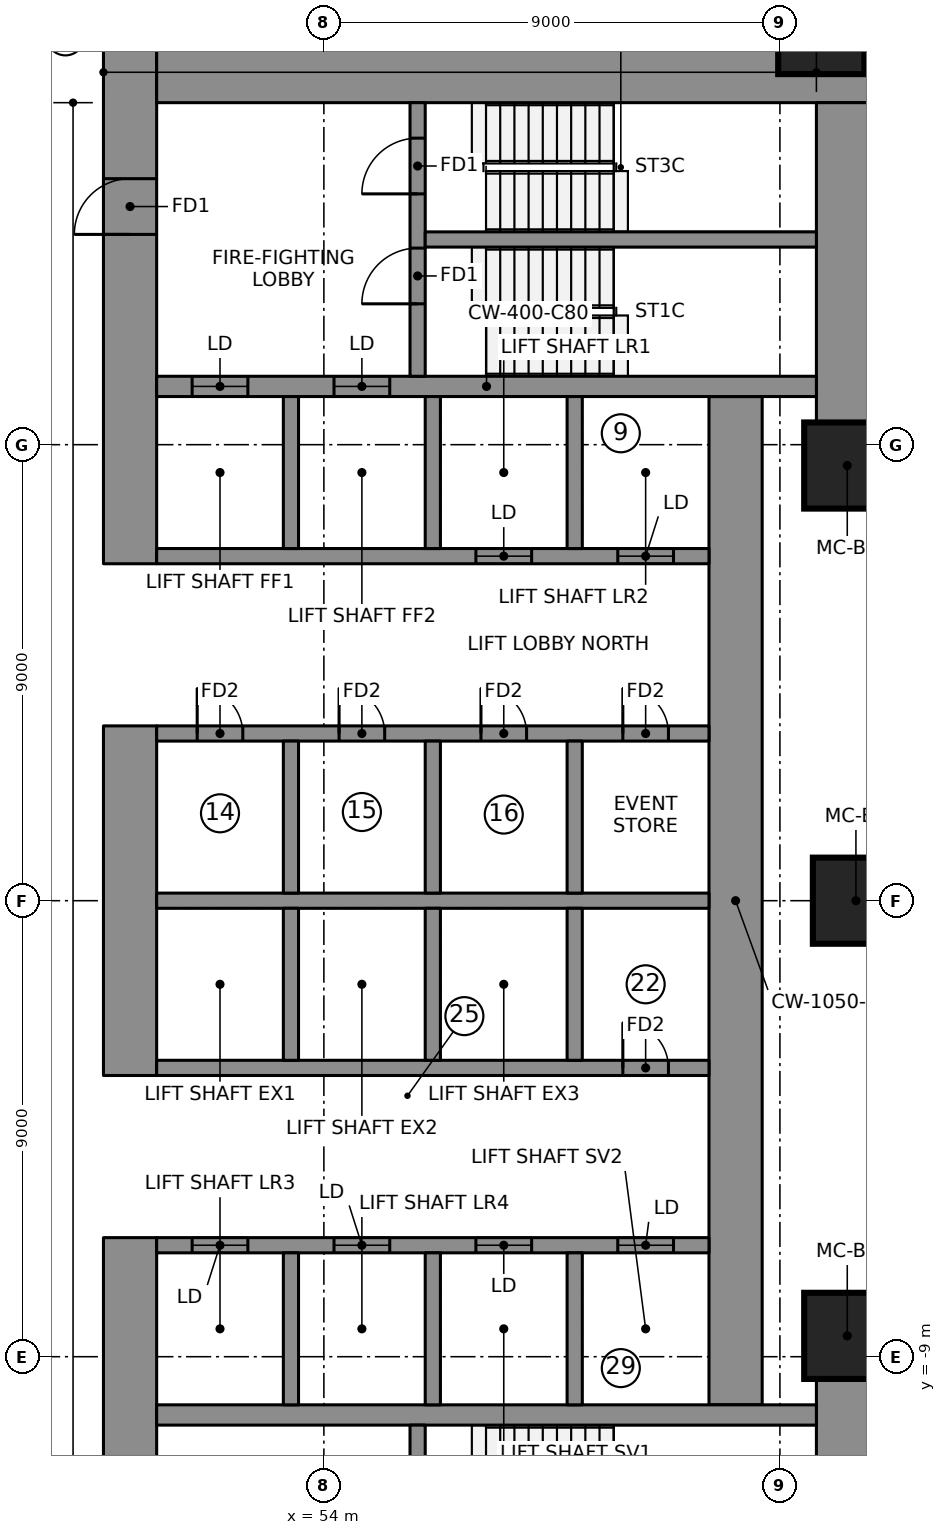
"""IFC4 building model, lengths in metres.
Left out: names, types, materials, properties, quantities, classifications, styles, units other than length and angle.
Written with IfcOpenShell. Run it as: python <this file> out.ifc"""

import sys

from ifc_helpers import new_model, si_unit, direction, frame, frame_2d, origin, origin_2d, place, context, subcontext, project, spatial, rectangle, extrude, element, fill, save


model = new_model("IFC4")
c1 = context("Model", 3, precision=1e-05, world=origin(), true_north=direction((0.0, 1.0)))
c2 = subcontext(c1, "Body", "Model", "MODEL_VIEW")
j1 = project(units=[si_unit("LENGTHUNIT", "METRE"), si_unit("PLANEANGLEUNIT", "RADIAN")], contexts=[c1])
p1 = place(None, origin())
s1 = spatial("IfcSite", under=j1, at=p1, CompositionType="ELEMENT")
p2 = place(p1, origin())
s2 = spatial("IfcBuilding", under=s1, at=p2, CompositionType="ELEMENT")
p3 = place(p2, frame((0.0, 0.0, 95.55)))
s3 = spatial("IfcBuildingStorey", under=s2, at=p3, CompositionType="ELEMENT", Elevation=95.55)
p4 = place(p3, frame((50.175, 6.65, 0.0), z_axis=(0.0, 0.0, 1.0), x_axis=(0.0, 1.0, 0.0)))
e1 = element("IfcWall", 1, at=p4, inside=s3, PredefinedType="SHEAR", context=c2, shape_type="SweptSolid", body=[
    extrude(rectangle(XDim=10.15, YDim=1.05, at=frame_2d((5.075, 0.0))), origin(), (0.0, 0.0, 1.0), 3.55),
])
p5 = place(p4, frame((6.5, 0.0, 0.0)))
e2 = element("IfcOpeningElement", 2, at=p5, cuts=e1, PredefinedType="OPENING", context=c2, shape_type="SweptSolid", body=[
    extrude(rectangle(XDim=1.1, YDim=2.1, at=frame_2d((0.55, 1.05))), frame((0.0, 0.535, 0.0), z_axis=(0.0, -1.0, 0.0), x_axis=(1.0, 0.0, 0.0)), (0.0, 0.0, 1.0), 1.07),
])
p6 = place(p3, frame((50.175, -3.45, 0.0), z_axis=(0.0, 0.0, 1.0), x_axis=(0.0, 1.0, 0.0)))
e3 = element("IfcWall", 3, at=p6, inside=s3, PredefinedType="SHEAR", context=c2, shape_type="SweptSolid", body=[
    extrude(rectangle(XDim=6.9, YDim=1.05, at=frame_2d((3.45, 0.0))), origin(), (0.0, 0.0, 1.0), 3.55),
])
p7 = place(p3, frame((50.175, -16.8, 0.0), z_axis=(0.0, 0.0, 1.0), x_axis=(0.0, 1.0, 0.0)))
e4 = element("IfcWall", 4, at=p7, inside=s3, PredefinedType="SHEAR", context=c2, shape_type="SweptSolid", body=[
    extrude(rectangle(XDim=10.15, YDim=1.05, at=frame_2d((5.075, 0.0))), origin(), (0.0, 0.0, 1.0), 3.55),
])
p8 = place(p7, frame((2.55, 0.0, 0.0)))
e5 = element("IfcOpeningElement", 5, at=p8, cuts=e4, PredefinedType="OPENING", context=c2, shape_type="SweptSolid", body=[
    extrude(rectangle(XDim=1.1, YDim=2.1, at=frame_2d((0.55, 1.05))), frame((0.0, 0.535, 0.0), z_axis=(0.0, -1.0, 0.0), x_axis=(1.0, 0.0, 0.0)), (0.0, 0.0, 1.0), 1.07),
])
p9 = place(p3, frame((50.7, 16.275, 0.0), z_axis=(0.0, 0.0, 1.0), x_axis=(1.0, 0.0, 0.0)))
e6 = element("IfcWall", 6, at=p9, inside=s3, PredefinedType="SHEAR", context=c2, shape_type="SweptSolid", body=[
    extrude(rectangle(XDim=14.07, YDim=1.05, at=frame_2d((7.035, 0.0))), origin(), (0.0, 0.0, 1.0), 3.55),
])
for number, where, z_axis, x_axis in (
    (7, (64.245, 9.389, 0.0), (0.0, 0.0, 1.0), (0.0, 1.0, 0.0)),
    (8, (64.245, -15.75, 0.0), (0.0, 0.0, 1.0), (0.0, 1.0, 0.0)),
):
    element("IfcWall", number, at=place(p3, frame(where, z_axis=z_axis, x_axis=x_axis)), inside=s3, PredefinedType="SHEAR", context=c2, shape_type="SweptSolid", body=[
        extrude(rectangle(XDim=6.361, YDim=1.05, at=frame_2d((3.181, 0.0))), origin(), (0.0, 0.0, 1.0), 3.55),
    ])
p10 = place(p3, frame((62.125, -9.95, 0.0), z_axis=(0.0, 0.0, 1.0), x_axis=(0.0, 1.0, 0.0)))
e9 = element("IfcWall", 9, at=p10, inside=s3, PredefinedType="SHEAR", context=c2, shape_type="SweptSolid", body=[
    extrude(rectangle(XDim=19.9, YDim=1.05, at=frame_2d((9.95, 0.0))), origin(), (0.0, 0.0, 1.0), 3.55),
])
p11 = place(p3, frame((50.7, 10.15, 0.0), z_axis=(0.0, 0.0, 1.0), x_axis=(1.0, 0.0, 0.0)))
e10 = element("IfcWall", 10, at=p11, inside=s3, PredefinedType="SHEAR", context=c2, shape_type="SweptSolid", body=[
    extrude(rectangle(XDim=13.02, YDim=0.4, at=frame_2d((6.51, 0.0))), origin(), (0.0, 0.0, 1.0), 3.55),
])
p12 = place(p11, frame((0.7, 0.0, 0.0)))
e11 = element("IfcOpeningElement", 11, at=p12, cuts=e10, PredefinedType="OPENING", context=c2, shape_type="SweptSolid", body=[
    extrude(rectangle(XDim=1.1, YDim=2.1, at=frame_2d((0.55, 1.05))), frame((0.0, 0.21, 0.0), z_axis=(0.0, -1.0, 0.0), x_axis=(1.0, 0.0, 0.0)), (0.0, 0.0, 1.0), 0.42),
])
p13 = place(p11, frame((3.5, 0.0, 0.0)))
e12 = element("IfcOpeningElement", 12, at=p13, cuts=e10, PredefinedType="OPENING", context=c2, shape_type="SweptSolid", body=[
    extrude(rectangle(XDim=1.1, YDim=2.1, at=frame_2d((0.55, 1.05))), frame((0.0, 0.21, 0.0), z_axis=(0.0, -1.0, 0.0), x_axis=(1.0, 0.0, 0.0)), (0.0, 0.0, 1.0), 0.42),
])
p14 = place(p3, frame((50.7, -10.15, 0.0), z_axis=(0.0, 0.0, 1.0), x_axis=(1.0, 0.0, 0.0)))
e13 = element("IfcWall", 13, at=p14, inside=s3, PredefinedType="SHEAR", context=c2, shape_type="SweptSolid", body=[
    extrude(rectangle(XDim=13.02, YDim=0.4, at=frame_2d((6.51, 0.0))), origin(), (0.0, 0.0, 1.0), 3.55),
])
p15 = place(p3, frame((50.7, 0.0, 0.0), z_axis=(0.0, 0.0, 1.0), x_axis=(1.0, 0.0, 0.0)))
e14 = element("IfcWall", 14, at=p15, inside=s3, PredefinedType="SHEAR", context=c2, shape_type="SweptSolid", body=[
    extrude(rectangle(XDim=10.9, YDim=0.3, at=frame_2d((5.45, 0.0))), origin(), (0.0, 0.0, 1.0), 3.55),
])
p16 = place(p3, frame((50.7, 3.3, 0.0), z_axis=(0.0, 0.0, 1.0), x_axis=(1.0, 0.0, 0.0)))
e15 = element("IfcWall", 15, at=p16, inside=s3, PredefinedType="SHEAR", context=c2, shape_type="SweptSolid", body=[
    extrude(rectangle(XDim=10.9, YDim=0.3, at=frame_2d((5.45, 0.0))), origin(), (0.0, 0.0, 1.0), 3.55),
])
p17 = place(p16, frame((0.8, 0.0, 0.0)))
e16 = element("IfcOpeningElement", 16, at=p17, cuts=e15, PredefinedType="OPENING", context=c2, shape_type="SweptSolid", body=[
    extrude(rectangle(XDim=0.9, YDim=2.1, at=frame_2d((0.45, 1.05))), frame((0.0, 0.16, 0.0), z_axis=(0.0, -1.0, 0.0), x_axis=(1.0, 0.0, 0.0)), (0.0, 0.0, 1.0), 0.32),
])
p18 = place(p16, frame((3.6, 0.0, 0.0)))
e17 = element("IfcOpeningElement", 17, at=p18, cuts=e15, PredefinedType="OPENING", context=c2, shape_type="SweptSolid", body=[
    extrude(rectangle(XDim=0.9, YDim=2.1, at=frame_2d((0.45, 1.05))), frame((0.0, 0.16, 0.0), z_axis=(0.0, -1.0, 0.0), x_axis=(1.0, 0.0, 0.0)), (0.0, 0.0, 1.0), 0.32),
])
p19 = place(p16, frame((6.4, 0.0, 0.0)))
e18 = element("IfcOpeningElement", 18, at=p19, cuts=e15, PredefinedType="OPENING", context=c2, shape_type="SweptSolid", body=[
    extrude(rectangle(XDim=0.9, YDim=2.1, at=frame_2d((0.45, 1.05))), frame((0.0, 0.16, 0.0), z_axis=(0.0, -1.0, 0.0), x_axis=(1.0, 0.0, 0.0)), (0.0, 0.0, 1.0), 0.32),
])
p20 = place(p16, frame((9.2, 0.0, 0.0)))
e19 = element("IfcOpeningElement", 19, at=p20, cuts=e15, PredefinedType="OPENING", context=c2, shape_type="SweptSolid", body=[
    extrude(rectangle(XDim=0.9, YDim=2.1, at=frame_2d((0.45, 1.05))), frame((0.0, 0.16, 0.0), z_axis=(0.0, -1.0, 0.0), x_axis=(1.0, 0.0, 0.0)), (0.0, 0.0, 1.0), 0.32),
])
p21 = place(p3, frame((50.7, 6.8, 0.0), z_axis=(0.0, 0.0, 1.0), x_axis=(1.0, 0.0, 0.0)))
e20 = element("IfcWall", 20, at=p21, inside=s3, PredefinedType="SHEAR", context=c2, shape_type="SweptSolid", body=[
    extrude(rectangle(XDim=10.9, YDim=0.3, at=frame_2d((5.45, 0.0))), origin(), (0.0, 0.0, 1.0), 3.55),
])
p22 = place(p21, frame((6.3, 0.0, 0.0)))
e21 = element("IfcOpeningElement", 21, at=p22, cuts=e20, PredefinedType="OPENING", context=c2, shape_type="SweptSolid", body=[
    extrude(rectangle(XDim=1.1, YDim=2.1, at=frame_2d((0.55, 1.05))), frame((0.0, 0.16, 0.0), z_axis=(0.0, -1.0, 0.0), x_axis=(1.0, 0.0, 0.0)), (0.0, 0.0, 1.0), 0.32),
])
p23 = place(p21, frame((9.1, 0.0, 0.0)))
e22 = element("IfcOpeningElement", 22, at=p23, cuts=e20, PredefinedType="OPENING", context=c2, shape_type="SweptSolid", body=[
    extrude(rectangle(XDim=1.1, YDim=2.1, at=frame_2d((0.55, 1.05))), frame((0.0, 0.16, 0.0), z_axis=(0.0, -1.0, 0.0), x_axis=(1.0, 0.0, 0.0)), (0.0, 0.0, 1.0), 0.32),
])
for number, where, z_axis, x_axis in (
    (23, (53.35, 0.15, 0.0), (0.0, 0.0, 1.0), (0.0, 1.0, 0.0)),
    (24, (53.35, 6.95, 0.0), (0.0, 0.0, 1.0), (0.0, 1.0, 0.0)),
    (25, (56.15, 0.15, 0.0), (0.0, 0.0, 1.0), (0.0, 1.0, 0.0)),
    (26, (56.15, 6.95, 0.0), (0.0, 0.0, 1.0), (0.0, 1.0, 0.0)),
    (27, (58.95, 0.15, 0.0), (0.0, 0.0, 1.0), (0.0, 1.0, 0.0)),
    (28, (58.95, 6.95, 0.0), (0.0, 0.0, 1.0), (0.0, 1.0, 0.0)),
):
    element("IfcWall", number, at=place(p3, frame(where, z_axis=z_axis, x_axis=x_axis)), inside=s3, PredefinedType="SHEAR", context=c2, shape_type="SweptSolid", body=[
        extrude(rectangle(XDim=3.0, YDim=0.3, at=frame_2d((1.5, 0.0))), origin(), (0.0, 0.0, 1.0), 3.55),
    ])
p24 = place(p3, frame((50.7, -3.3, 0.0), z_axis=(0.0, 0.0, 1.0), x_axis=(1.0, 0.0, 0.0)))
e29 = element("IfcWall", 29, at=p24, inside=s3, PredefinedType="SHEAR", context=c2, shape_type="SweptSolid", body=[
    extrude(rectangle(XDim=10.9, YDim=0.3, at=frame_2d((5.45, 0.0))), origin(), (0.0, 0.0, 1.0), 3.55),
])
p25 = place(p24, frame((9.2, 0.0, 0.0)))
e30 = element("IfcOpeningElement", 30, at=p25, cuts=e29, PredefinedType="OPENING", context=c2, shape_type="SweptSolid", body=[
    extrude(rectangle(XDim=0.9, YDim=2.1, at=frame_2d((0.45, 1.05))), frame((0.0, 0.16, 0.0), z_axis=(0.0, -1.0, 0.0), x_axis=(1.0, 0.0, 0.0)), (0.0, 0.0, 1.0), 0.32),
])
p26 = place(p3, frame((50.7, -6.8, 0.0), z_axis=(0.0, 0.0, 1.0), x_axis=(1.0, 0.0, 0.0)))
e31 = element("IfcWall", 31, at=p26, inside=s3, PredefinedType="SHEAR", context=c2, shape_type="SweptSolid", body=[
    extrude(rectangle(XDim=10.9, YDim=0.3, at=frame_2d((5.45, 0.0))), origin(), (0.0, 0.0, 1.0), 3.55),
])
p27 = place(p26, frame((0.7, 0.0, 0.0)))
e32 = element("IfcOpeningElement", 32, at=p27, cuts=e31, PredefinedType="OPENING", context=c2, shape_type="SweptSolid", body=[
    extrude(rectangle(XDim=1.1, YDim=2.1, at=frame_2d((0.55, 1.05))), frame((0.0, 0.16, 0.0), z_axis=(0.0, -1.0, 0.0), x_axis=(1.0, 0.0, 0.0)), (0.0, 0.0, 1.0), 0.32),
])
p28 = place(p26, frame((3.5, 0.0, 0.0)))
e33 = element("IfcOpeningElement", 33, at=p28, cuts=e31, PredefinedType="OPENING", context=c2, shape_type="SweptSolid", body=[
    extrude(rectangle(XDim=1.1, YDim=2.1, at=frame_2d((0.55, 1.05))), frame((0.0, 0.16, 0.0), z_axis=(0.0, -1.0, 0.0), x_axis=(1.0, 0.0, 0.0)), (0.0, 0.0, 1.0), 0.32),
])
p29 = place(p26, frame((6.3, 0.0, 0.0)))
e34 = element("IfcOpeningElement", 34, at=p29, cuts=e31, PredefinedType="OPENING", context=c2, shape_type="SweptSolid", body=[
    extrude(rectangle(XDim=1.1, YDim=2.1, at=frame_2d((0.55, 1.05))), frame((0.0, 0.16, 0.0), z_axis=(0.0, -1.0, 0.0), x_axis=(1.0, 0.0, 0.0)), (0.0, 0.0, 1.0), 0.32),
])
p30 = place(p26, frame((9.1, 0.0, 0.0)))
e35 = element("IfcOpeningElement", 35, at=p30, cuts=e31, PredefinedType="OPENING", context=c2, shape_type="SweptSolid", body=[
    extrude(rectangle(XDim=1.1, YDim=2.1, at=frame_2d((0.55, 1.05))), frame((0.0, 0.16, 0.0), z_axis=(0.0, -1.0, 0.0), x_axis=(1.0, 0.0, 0.0)), (0.0, 0.0, 1.0), 0.32),
])
for number, where, z_axis, x_axis in (
    (36, (53.35, -3.15, 0.0), (0.0, 0.0, 1.0), (0.0, 1.0, 0.0)),
    (37, (53.35, -9.95, 0.0), (0.0, 0.0, 1.0), (0.0, 1.0, 0.0)),
    (38, (56.15, -3.15, 0.0), (0.0, 0.0, 1.0), (0.0, 1.0, 0.0)),
    (39, (56.15, -9.95, 0.0), (0.0, 0.0, 1.0), (0.0, 1.0, 0.0)),
    (40, (58.95, -3.15, 0.0), (0.0, 0.0, 1.0), (0.0, 1.0, 0.0)),
    (41, (58.95, -9.95, 0.0), (0.0, 0.0, 1.0), (0.0, 1.0, 0.0)),
):
    element("IfcWall", number, at=place(p3, frame(where, z_axis=z_axis, x_axis=x_axis)), inside=s3, PredefinedType="SHEAR", context=c2, shape_type="SweptSolid", body=[
        extrude(rectangle(XDim=3.0, YDim=0.3, at=frame_2d((1.5, 0.0))), origin(), (0.0, 0.0, 1.0), 3.55),
    ])
p31 = place(p3, frame((55.85, 10.35, 0.0), z_axis=(0.0, 0.0, 1.0), x_axis=(0.0, 1.0, 0.0)))
e42 = element("IfcWall", 42, at=p31, inside=s3, PredefinedType="SHEAR", context=c2, shape_type="SweptSolid", body=[
    extrude(rectangle(XDim=5.4, YDim=0.3, at=frame_2d((2.7, 0.0))), origin(), (0.0, 0.0, 1.0), 3.55),
])
p32 = place(p31, frame((1.43, 0.0, 0.0)))
e43 = element("IfcOpeningElement", 43, at=p32, cuts=e42, PredefinedType="OPENING", context=c2, shape_type="SweptSolid", body=[
    extrude(rectangle(XDim=1.1, YDim=2.1, at=frame_2d((0.55, 1.05))), frame((0.0, 0.16, 0.0), z_axis=(0.0, -1.0, 0.0), x_axis=(1.0, 0.0, 0.0)), (0.0, 0.0, 1.0), 0.32),
])
p33 = place(p31, frame((3.6, 0.0, 0.0)))
e44 = element("IfcOpeningElement", 44, at=p33, cuts=e42, PredefinedType="OPENING", context=c2, shape_type="SweptSolid", body=[
    extrude(rectangle(XDim=1.1, YDim=2.1, at=frame_2d((0.55, 1.05))), frame((0.0, 0.16, 0.0), z_axis=(0.0, -1.0, 0.0), x_axis=(1.0, 0.0, 0.0)), (0.0, 0.0, 1.0), 0.32),
])
p34 = place(p3, frame((55.85, -15.75, 0.0), z_axis=(0.0, 0.0, 1.0), x_axis=(0.0, 1.0, 0.0)))
e45 = element("IfcWall", 45, at=p34, inside=s3, PredefinedType="SHEAR", context=c2, shape_type="SweptSolid", body=[
    extrude(rectangle(XDim=5.4, YDim=0.3, at=frame_2d((2.7, 0.0))), origin(), (0.0, 0.0, 1.0), 3.55),
])
p35 = place(p34, frame((3.6, 0.0, 0.0)))
e46 = element("IfcOpeningElement", 46, at=p35, cuts=e45, PredefinedType="OPENING", context=c2, shape_type="SweptSolid", body=[
    extrude(rectangle(XDim=1.1, YDim=2.1, at=frame_2d((0.55, 1.05))), frame((0.0, 0.16, 0.0), z_axis=(0.0, -1.0, 0.0), x_axis=(1.0, 0.0, 0.0)), (0.0, 0.0, 1.0), 0.32),
])
p36 = place(p34, frame((0.8, 0.0, 0.0)))
e47 = element("IfcOpeningElement", 47, at=p36, cuts=e45, PredefinedType="OPENING", context=c2, shape_type="SweptSolid", body=[
    extrude(rectangle(XDim=0.9, YDim=2.1, at=frame_2d((0.45, 1.05))), frame((0.0, 0.16, 0.0), z_axis=(0.0, -1.0, 0.0), x_axis=(1.0, 0.0, 0.0)), (0.0, 0.0, 1.0), 0.32),
])
p37 = place(p3, frame((56.0, 13.05, 0.0), z_axis=(0.0, 0.0, 1.0), x_axis=(1.0, 0.0, 0.0)))
e48 = element("IfcWall", 48, at=p37, inside=s3, PredefinedType="SHEAR", context=c2, shape_type="SweptSolid", body=[
    extrude(rectangle(XDim=7.72, YDim=0.3, at=frame_2d((3.86, 0.0))), origin(), (0.0, 0.0, 1.0), 3.55),
])
for number, where, z_axis, x_axis in (
    (49, (64.329, -8.589, 0.0), (0.0, 0.0, 1.0), (1.0, 0.0, 0.0)),
    (50, (64.5, 0.0, 0.0), (0.0, 0.0, 1.0), (1.0, 0.0, 0.0)),
    (51, (64.329, 8.589, 0.0), (0.0, 0.0, 1.0), (1.0, 0.0, 0.0)),
    (52, (63.816, 17.164, 0.0), (0.0, 0.0, 1.0), (1.0, 0.0, 0.0)),
):
    element("IfcColumn", number, at=place(p3, frame(where, z_axis=z_axis, x_axis=x_axis)), inside=s3, PredefinedType="COLUMN", context=c2, shape_type="SweptSolid", body=[
        extrude(rectangle(XDim=1.7, YDim=1.7, at=origin_2d()), origin(), (0.0, 0.0, 1.0), 3.55),
    ])
p38 = place(p12, origin())
e53 = element("IfcDoor", 53, at=p38, inside=s3, OperationType="DOUBLE_DOOR_SLIDING", PredefinedType="DOOR", context=c2, shape_type="SweptSolid", body=[
    extrude(rectangle(XDim=1.1, YDim=2.1, at=frame_2d((0.55, 1.05))), frame((0.0, 0.025, 0.0), z_axis=(0.0, -1.0, 0.0), x_axis=(1.0, 0.0, 0.0)), (0.0, 0.0, 1.0), 0.05),
])
fill(e11, e53)
p39 = place(p13, origin())
e54 = element("IfcDoor", 54, at=p39, inside=s3, OperationType="DOUBLE_DOOR_SLIDING", PredefinedType="DOOR", context=c2, shape_type="SweptSolid", body=[
    extrude(rectangle(XDim=1.1, YDim=2.1, at=frame_2d((0.55, 1.05))), frame((0.0, 0.025, 0.0), z_axis=(0.0, -1.0, 0.0), x_axis=(1.0, 0.0, 0.0)), (0.0, 0.0, 1.0), 0.05),
])
fill(e12, e54)
p40 = place(p22, origin())
e55 = element("IfcDoor", 55, at=p40, inside=s3, OperationType="DOUBLE_DOOR_SLIDING", PredefinedType="DOOR", context=c2, shape_type="SweptSolid", body=[
    extrude(rectangle(XDim=1.1, YDim=2.1, at=frame_2d((0.55, 1.05))), frame((0.0, 0.025, 0.0), z_axis=(0.0, -1.0, 0.0), x_axis=(1.0, 0.0, 0.0)), (0.0, 0.0, 1.0), 0.05),
])
fill(e21, e55)
p41 = place(p23, origin())
e56 = element("IfcDoor", 56, at=p41, inside=s3, OperationType="DOUBLE_DOOR_SLIDING", PredefinedType="DOOR", context=c2, shape_type="SweptSolid", body=[
    extrude(rectangle(XDim=1.1, YDim=2.1, at=frame_2d((0.55, 1.05))), frame((0.0, 0.025, 0.0), z_axis=(0.0, -1.0, 0.0), x_axis=(1.0, 0.0, 0.0)), (0.0, 0.0, 1.0), 0.05),
])
fill(e22, e56)
p42 = place(p27, origin())
e57 = element("IfcDoor", 57, at=p42, inside=s3, OperationType="DOUBLE_DOOR_SLIDING", PredefinedType="DOOR", context=c2, shape_type="SweptSolid", body=[
    extrude(rectangle(XDim=1.1, YDim=2.1, at=frame_2d((0.55, 1.05))), frame((0.0, 0.025, 0.0), z_axis=(0.0, -1.0, 0.0), x_axis=(1.0, 0.0, 0.0)), (0.0, 0.0, 1.0), 0.05),
])
fill(e32, e57)
p43 = place(p28, origin())
e58 = element("IfcDoor", 58, at=p43, inside=s3, OperationType="DOUBLE_DOOR_SLIDING", PredefinedType="DOOR", context=c2, shape_type="SweptSolid", body=[
    extrude(rectangle(XDim=1.1, YDim=2.1, at=frame_2d((0.55, 1.05))), frame((0.0, 0.025, 0.0), z_axis=(0.0, -1.0, 0.0), x_axis=(1.0, 0.0, 0.0)), (0.0, 0.0, 1.0), 0.05),
])
fill(e33, e58)
p44 = place(p29, origin())
e59 = element("IfcDoor", 59, at=p44, inside=s3, OperationType="DOUBLE_DOOR_SLIDING", PredefinedType="DOOR", context=c2, shape_type="SweptSolid", body=[
    extrude(rectangle(XDim=1.1, YDim=2.1, at=frame_2d((0.55, 1.05))), frame((0.0, 0.025, 0.0), z_axis=(0.0, -1.0, 0.0), x_axis=(1.0, 0.0, 0.0)), (0.0, 0.0, 1.0), 0.05),
])
fill(e34, e59)
p45 = place(p30, origin())
e60 = element("IfcDoor", 60, at=p45, inside=s3, OperationType="DOUBLE_DOOR_SLIDING", PredefinedType="DOOR", context=c2, shape_type="SweptSolid", body=[
    extrude(rectangle(XDim=1.1, YDim=2.1, at=frame_2d((0.55, 1.05))), frame((0.0, 0.025, 0.0), z_axis=(0.0, -1.0, 0.0), x_axis=(1.0, 0.0, 0.0)), (0.0, 0.0, 1.0), 0.05),
])
fill(e35, e60)
p46 = place(p32, origin())
e61 = element("IfcDoor", 61, at=p46, inside=s3, OperationType="SINGLE_SWING_RIGHT", PredefinedType="DOOR", context=c2, shape_type="SweptSolid", body=[
    extrude(rectangle(XDim=1.1, YDim=2.1, at=frame_2d((0.55, 1.05))), frame((0.0, 0.025, 0.0), z_axis=(0.0, -1.0, 0.0), x_axis=(1.0, 0.0, 0.0)), (0.0, 0.0, 1.0), 0.05),
])
fill(e43, e61)
p47 = place(p33, origin())
e62 = element("IfcDoor", 62, at=p47, inside=s3, OperationType="SINGLE_SWING_RIGHT", PredefinedType="DOOR", context=c2, shape_type="SweptSolid", body=[
    extrude(rectangle(XDim=1.1, YDim=2.1, at=frame_2d((0.55, 1.05))), frame((0.0, 0.025, 0.0), z_axis=(0.0, -1.0, 0.0), x_axis=(1.0, 0.0, 0.0)), (0.0, 0.0, 1.0), 0.05),
])
fill(e44, e62)
p48 = place(p5, origin())
e63 = element("IfcDoor", 63, at=p48, inside=s3, OperationType="SINGLE_SWING_RIGHT", PredefinedType="DOOR", context=c2, shape_type="SweptSolid", body=[
    extrude(rectangle(XDim=1.1, YDim=2.1, at=frame_2d((0.55, 1.05))), frame((0.0, 0.025, 0.0), z_axis=(0.0, -1.0, 0.0), x_axis=(1.0, 0.0, 0.0)), (0.0, 0.0, 1.0), 0.05),
])
fill(e2, e63)
p49 = place(p17, origin())
e64 = element("IfcDoor", 64, at=p49, inside=s3, OperationType="SINGLE_SWING_LEFT", PredefinedType="DOOR", context=c2, shape_type="SweptSolid", body=[
    extrude(rectangle(XDim=0.9, YDim=2.1, at=frame_2d((0.45, 1.05))), frame((0.0, 0.025, 0.0), z_axis=(0.0, -1.0, 0.0), x_axis=(1.0, 0.0, 0.0)), (0.0, 0.0, 1.0), 0.05),
])
fill(e16, e64)
p50 = place(p18, origin())
e65 = element("IfcDoor", 65, at=p50, inside=s3, OperationType="SINGLE_SWING_LEFT", PredefinedType="DOOR", context=c2, shape_type="SweptSolid", body=[
    extrude(rectangle(XDim=0.9, YDim=2.1, at=frame_2d((0.45, 1.05))), frame((0.0, 0.025, 0.0), z_axis=(0.0, -1.0, 0.0), x_axis=(1.0, 0.0, 0.0)), (0.0, 0.0, 1.0), 0.05),
])
fill(e17, e65)
p51 = place(p19, origin())
e66 = element("IfcDoor", 66, at=p51, inside=s3, OperationType="SINGLE_SWING_LEFT", PredefinedType="DOOR", context=c2, shape_type="SweptSolid", body=[
    extrude(rectangle(XDim=0.9, YDim=2.1, at=frame_2d((0.45, 1.05))), frame((0.0, 0.025, 0.0), z_axis=(0.0, -1.0, 0.0), x_axis=(1.0, 0.0, 0.0)), (0.0, 0.0, 1.0), 0.05),
])
fill(e18, e66)
p52 = place(p20, origin())
e67 = element("IfcDoor", 67, at=p52, inside=s3, OperationType="SINGLE_SWING_LEFT", PredefinedType="DOOR", context=c2, shape_type="SweptSolid", body=[
    extrude(rectangle(XDim=0.9, YDim=2.1, at=frame_2d((0.45, 1.05))), frame((0.0, 0.025, 0.0), z_axis=(0.0, -1.0, 0.0), x_axis=(1.0, 0.0, 0.0)), (0.0, 0.0, 1.0), 0.05),
])
fill(e19, e67)
p53 = place(p25, origin())
e68 = element("IfcDoor", 68, at=p53, inside=s3, OperationType="SINGLE_SWING_LEFT", PredefinedType="DOOR", context=c2, shape_type="SweptSolid", body=[
    extrude(rectangle(XDim=0.9, YDim=2.1, at=frame_2d((0.45, 1.05))), frame((0.0, 0.025, 0.0), z_axis=(0.0, -1.0, 0.0), x_axis=(1.0, 0.0, 0.0)), (0.0, 0.0, 1.0), 0.05),
])
fill(e30, e68)
save(model, sys.argv[1])
